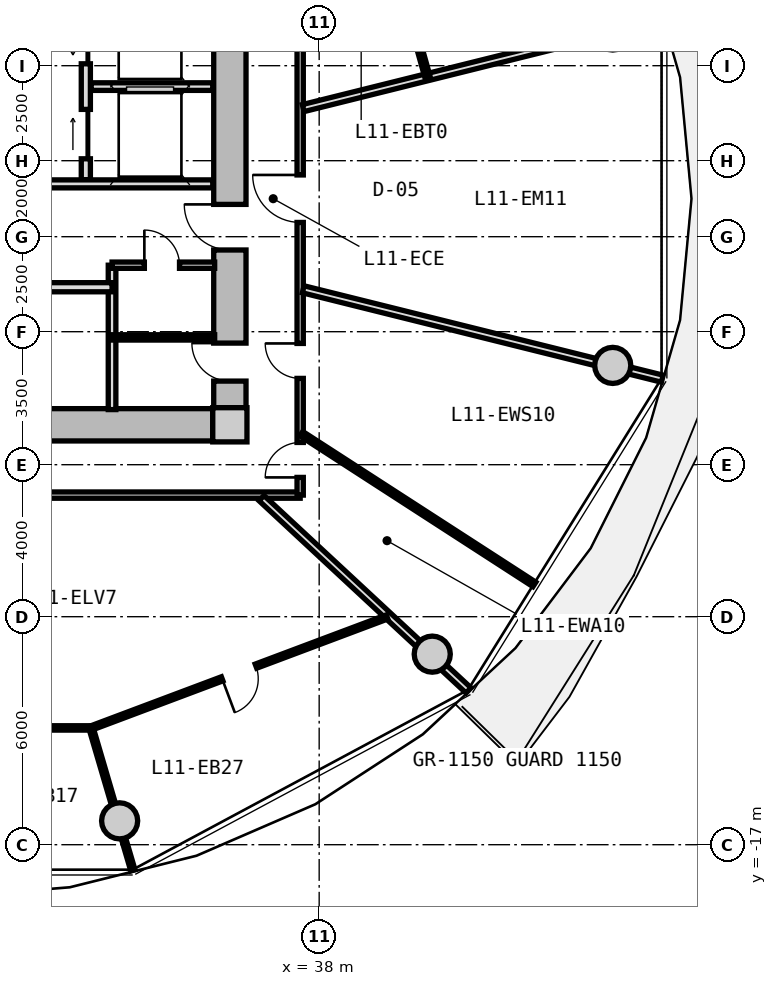
"""IFC4 building model, lengths in metres.
Left out: names, types, materials, properties, quantities, classifications, styles, units other than length and angle.
Written with IfcOpenShell. Run it as: python <this file> out.ifc"""

import sys

from ifc_helpers import new_model, si_unit, direction, frame, frame_2d, origin, origin_2d, place, context, subcontext, project, spatial, rectangle, circle, extrude, source, transform, mapped, element, fill, save


model = new_model("IFC4")
c1 = context("Model", 3, precision=1e-05, world=origin(), true_north=direction((0.0, 1.0)))
c2 = subcontext(c1, "Body", "Model", "MODEL_VIEW")
j1 = project(units=[si_unit("LENGTHUNIT", "METRE"), si_unit("PLANEANGLEUNIT", "RADIAN")], contexts=[c1])
p1 = place(None, origin())
s1 = spatial("IfcSite", under=j1, at=p1, CompositionType="ELEMENT")
p2 = place(p1, origin())
s2 = spatial("IfcBuilding", under=s1, at=p2, CompositionType="ELEMENT")
p3 = place(p2, frame((0.0, 0.0, 39.9)))
s3 = spatial("IfcBuildingStorey", under=s2, at=p3, CompositionType="ELEMENT", Elevation=39.9)
m1 = source(origin(), c2, "Body", "SweptSolid", [
    extrude(rectangle(XDim=0.9, YDim=0.9, at=origin_2d()), origin(), (0.0, 0.0, 1.0), 3.05),
])
p4 = place(p3, frame((35.65, -5.95, 0.0), z_axis=(0.0, 0.0, 1.0), x_axis=(1.0, 0.0, 0.0)))
e1 = element("IfcColumn", 1, at=p4, inside=s3, PredefinedType="COLUMN", context=c2, shape_type="MappedRepresentation", body=[
    mapped(m1, transform((0.0, 0.0, 0.0), x_axis=(1.0, 0.0, 0.0), y_axis=(0.0, 1.0, 0.0), z_axis=(0.0, 0.0, 1.0), scale=1.0)),
])
m2 = source(origin(), c2, "Body", "SweptSolid", [
    extrude(rectangle(XDim=14.4, YDim=0.85, at=frame_2d((7.2, 0.0))), origin(), (0.0, 0.0, 1.0), 2.79),
])
p5 = place(p3, frame((35.2, -5.95, 0.0), z_axis=(0.0, 0.0, 1.0), x_axis=(-1.0, 0.0, 0.0)))
e2 = element("IfcWall", 2, at=p5, inside=s3, PredefinedType="SHEAR", context=c2, shape_type="MappedRepresentation", body=[
    mapped(m2, transform((0.0, 0.0, 0.0), x_axis=(1.0, 0.0, 0.0), y_axis=(0.0, 1.0, 0.0), z_axis=(0.0, 0.0, 1.0), scale=1.0)),
])
m3 = source(origin(), c2, "Body", "SweptSolid", [
    extrude(rectangle(XDim=11.0, YDim=0.85, at=frame_2d((5.5, 0.0))), origin(), (0.0, 0.0, 1.0), 2.79),
])
p6 = place(p3, frame((35.65, 5.5, 0.0), z_axis=(0.0, 0.0, 1.0), x_axis=(0.0, -1.0, 0.0)))
e3 = element("IfcWall", 3, at=p6, inside=s3, PredefinedType="SHEAR", context=c2, shape_type="MappedRepresentation", body=[
    mapped(m3, transform((0.0, 0.0, 0.0), x_axis=(1.0, 0.0, 0.0), y_axis=(0.0, 1.0, 0.0), z_axis=(0.0, 0.0, 1.0), scale=1.0)),
])
p7 = place(p6, frame((5.65, 0.0, 0.0)))
e4 = element("IfcOpeningElement", 4, at=p7, cuts=e3, PredefinedType="OPENING", context=c2, shape_type="SweptSolid", body=[
    extrude(rectangle(XDim=1.2, YDim=2.15, at=frame_2d((0.6, 1.075))), frame((0.0, 0.435, 0.0), z_axis=(0.0, -1.0, 0.0), x_axis=(1.0, 0.0, 0.0)), (0.0, 0.0, 1.0), 0.87),
])
p8 = place(p6, frame((9.3, 0.0, 0.0)))
e5 = element("IfcOpeningElement", 5, at=p8, cuts=e3, PredefinedType="OPENING", context=c2, shape_type="SweptSolid", body=[
    extrude(rectangle(XDim=1.0, YDim=2.1, at=frame_2d((0.5, 1.05))), frame((0.0, 0.435, 0.0), z_axis=(0.0, -1.0, 0.0), x_axis=(1.0, 0.0, 0.0)), (0.0, 0.0, 1.0), 0.87),
])
m4 = source(origin(), c2, "Body", "SweptSolid", [
    extrude(circle(Radius=0.475, at=origin_2d()), origin(), (0.0, 0.0, 1.0), 3.05),
])
for number, where, z_axis, x_axis in (
    (6, (32.749, -16.373, 0.0), (0.0, 0.0, 1.0), (1.0, 0.0, 0.0)),
    (7, (40.975, -11.985, 0.0), (0.0, 0.0, 1.0), (1.0, 0.0, 0.0)),
    (8, (45.725, -4.387, 0.0), (0.0, 0.0, 1.0), (1.0, 0.0, 0.0)),
):
    element("IfcColumn", number, at=place(p3, frame(where, z_axis=z_axis, x_axis=x_axis)), inside=s3, PredefinedType="COLUMN", context=c2, shape_type="MappedRepresentation", body=[
        mapped(m4, transform((0.0, 0.0, 0.0), x_axis=(1.0, 0.0, 0.0), y_axis=(0.0, 1.0, 0.0), z_axis=(0.0, 0.0, 1.0), scale=1.0)),
    ])
m5 = source(origin(), c2, "Body", "SweptSolid", [
    extrude(rectangle(XDim=5.0, YDim=0.24, at=frame_2d((2.5, 0.0))), origin(), (0.0, 0.0, 1.0), 2.775),
])
p9 = place(p3, frame((31.86, 0.5, 0.0), z_axis=(0.0, 0.0, 1.0), x_axis=(0.0, 1.0, 0.0)))
e9 = element("IfcWall", 9, at=p9, inside=s3, PredefinedType="PARTITIONING", context=c2, shape_type="MappedRepresentation", body=[
    mapped(m5, transform((0.0, 0.0, 0.0), x_axis=(1.0, 0.0, 0.0), y_axis=(0.0, 1.0, 0.0), z_axis=(0.0, 0.0, 1.0), scale=1.0)),
])
p10 = place(p9, frame((3.05, 0.0, 0.0)))
e10 = element("IfcOpeningElement", 10, at=p10, cuts=e9, PredefinedType="OPENING", context=c2, shape_type="SweptSolid", body=[
    extrude(rectangle(XDim=1.3, YDim=2.2, at=frame_2d((0.65, 1.1))), frame((0.0, 0.13, 0.0), z_axis=(0.0, -1.0, 0.0), x_axis=(1.0, 0.0, 0.0)), (0.0, 0.0, 1.0), 0.26),
])
p11 = place(p9, frame((0.55, 0.0, 0.0)))
e11 = element("IfcOpeningElement", 11, at=p11, cuts=e9, PredefinedType="OPENING", context=c2, shape_type="SweptSolid", body=[
    extrude(rectangle(XDim=1.3, YDim=2.2, at=frame_2d((0.65, 1.1))), frame((0.0, 0.13, 0.0), z_axis=(0.0, -1.0, 0.0), x_axis=(1.0, 0.0, 0.0)), (0.0, 0.0, 1.0), 0.26),
])
m6 = source(origin(), c2, "Body", "SweptSolid", [
    extrude(rectangle(XDim=3.2, YDim=0.2, at=frame_2d((1.6, 0.0))), origin(), (0.0, 0.0, 1.0), 2.775),
])
p12 = place(p3, frame((32.0, 2.95, 0.0), z_axis=(0.0, 0.0, 1.0), x_axis=(1.0, 0.0, 0.0)))
e12 = element("IfcWall", 12, at=p12, inside=s3, PredefinedType="PARTITIONING", context=c2, shape_type="MappedRepresentation", body=[
    mapped(m6, transform((0.0, 0.0, 0.0), x_axis=(1.0, 0.0, 0.0), y_axis=(0.0, 1.0, 0.0), z_axis=(0.0, 0.0, 1.0), scale=1.0)),
])
m7 = source(origin(), c2, "Body", "SweptSolid", [
    extrude(rectangle(XDim=6.66, YDim=0.21, at=frame_2d((3.33, 0.0))), origin(), (0.0, 0.0, 1.0), 2.775),
])
p13 = place(p3, frame((28.54, 0.39, 0.0), z_axis=(0.0, 0.0, 1.0), x_axis=(1.0, 0.0, 0.0)))
e13 = element("IfcWall", 13, at=p13, inside=s3, PredefinedType="PARTITIONING", context=c2, shape_type="MappedRepresentation", body=[
    mapped(m7, transform((0.0, 0.0, 0.0), x_axis=(1.0, 0.0, 0.0), y_axis=(0.0, 1.0, 0.0), z_axis=(0.0, 0.0, 1.0), scale=1.0)),
])
p14 = place(p13, frame((1.0, 0.0, 0.0)))
e14 = element("IfcOpeningElement", 14, at=p14, cuts=e13, PredefinedType="OPENING", context=c2, shape_type="SweptSolid", body=[
    extrude(rectangle(XDim=1.2, YDim=2.15, at=frame_2d((0.6, 1.075))), frame((0.0, 0.115, 0.0), z_axis=(0.0, -1.0, 0.0), x_axis=(1.0, 0.0, 0.0)), (0.0, 0.0, 1.0), 0.23),
])
m8 = source(origin(), c2, "Body", "SweptSolid", [
    extrude(rectangle(XDim=3.8, YDim=0.2, at=frame_2d((1.9, 0.0))), origin(), (0.0, 0.0, 1.0), 2.775),
])
p15 = place(p3, frame((32.55, -5.55, 0.0), z_axis=(0.0, 0.0, 1.0), x_axis=(0.0, 1.0, 0.0)))
e15 = element("IfcWall", 15, at=p15, inside=s3, PredefinedType="PARTITIONING", context=c2, shape_type="MappedRepresentation", body=[
    mapped(m8, transform((0.0, 0.0, 0.0), x_axis=(1.0, 0.0, 0.0), y_axis=(0.0, 1.0, 0.0), z_axis=(0.0, 0.0, 1.0), scale=1.0)),
])
m9 = source(origin(), c2, "Body", "SweptSolid", [
    extrude(rectangle(XDim=4.13, YDim=0.24, at=frame_2d((2.065, 0.0))), origin(), (0.0, 0.0, 1.0), 2.775),
])
p16 = place(p3, frame((28.42, -2.33, 0.0), z_axis=(0.0, 0.0, 1.0), x_axis=(1.0, 0.0, 0.0)))
e16 = element("IfcWall", 16, at=p16, inside=s3, PredefinedType="PARTITIONING", context=c2, shape_type="MappedRepresentation", body=[
    mapped(m9, transform((0.0, 0.0, 0.0), x_axis=(1.0, 0.0, 0.0), y_axis=(0.0, 1.0, 0.0), z_axis=(0.0, 0.0, 1.0), scale=1.0)),
])
m10 = source(origin(), c2, "Body", "SweptSolid", [
    extrude(rectangle(XDim=2.7, YDim=0.165, at=frame_2d((1.35, 0.0))), origin(), (0.0, 0.0, 1.0), 2.775),
])
p17 = place(p3, frame((32.55, -1.75, 0.0), z_axis=(0.0, 0.0, 1.0), x_axis=(1.0, 0.0, 0.0)))
e17 = element("IfcWall", 17, at=p17, inside=s3, PredefinedType="PARTITIONING", context=c2, shape_type="MappedRepresentation", body=[
    mapped(m10, transform((0.0, 0.0, 0.0), x_axis=(1.0, 0.0, 0.0), y_axis=(0.0, 1.0, 0.0), z_axis=(0.0, 0.0, 1.0), scale=1.0)),
])
p18 = place(p17, frame((0.85, 0.0, 0.0)))
e18 = element("IfcOpeningElement", 18, at=p18, cuts=e17, PredefinedType="OPENING", context=c2, shape_type="SweptSolid", body=[
    extrude(rectangle(XDim=0.925, YDim=2.1, at=frame_2d((0.462, 1.05))), frame((0.0, 0.093, 0.0), z_axis=(0.0, -1.0, 0.0), x_axis=(1.0, 0.0, 0.0)), (0.0, 0.0, 1.0), 0.185),
])
m11 = source(origin(), c2, "Body", "SweptSolid", [
    extrude(rectangle(XDim=2.7, YDim=0.14, at=frame_2d((1.35, 0.0))), origin(), (0.0, 0.0, 1.0), 2.775),
])
p19 = place(p3, frame((32.55, -3.65, 0.0), z_axis=(0.0, 0.0, 1.0), x_axis=(1.0, 0.0, 0.0)))
e19 = element("IfcWall", 19, at=p19, inside=s3, PredefinedType="PARTITIONING", context=c2, shape_type="MappedRepresentation", body=[
    mapped(m11, transform((0.0, 0.0, 0.0), x_axis=(1.0, 0.0, 0.0), y_axis=(0.0, 1.0, 0.0), z_axis=(0.0, 0.0, 1.0), scale=1.0)),
])
m12 = source(origin(), c2, "Body", "SweptSolid", [
    extrude(rectangle(XDim=19.0, YDim=0.165, at=frame_2d((9.5, 0.0))), origin(), (0.0, 0.0, 1.0), 2.775),
])
p20 = place(p3, frame((37.5, -7.8, 0.0), z_axis=(0.0, 0.0, 1.0), x_axis=(-1.0, 0.0, 0.0)))
e20 = element("IfcWall", 20, at=p20, inside=s3, PredefinedType="PARTITIONING", context=c2, shape_type="MappedRepresentation", body=[
    mapped(m12, transform((0.0, 0.0, 0.0), x_axis=(1.0, 0.0, 0.0), y_axis=(0.0, 1.0, 0.0), z_axis=(0.0, 0.0, 1.0), scale=1.0)),
])
p21 = place(p20, frame((7.336, 0.0, 0.0)))
e21 = element("IfcOpeningElement", 21, at=p21, cuts=e20, PredefinedType="OPENING", context=c2, shape_type="SweptSolid", body=[
    extrude(rectangle(XDim=1.05, YDim=2.15, at=frame_2d((0.525, 1.075))), frame((0.0, 0.093, 0.0), z_axis=(0.0, -1.0, 0.0), x_axis=(1.0, 0.0, 0.0)), (0.0, 0.0, 1.0), 0.185),
])
m13 = source(origin(), c2, "Body", "SweptSolid", [
    extrude(rectangle(XDim=15.6, YDim=0.165, at=frame_2d((7.8, 0.0))), origin(), (0.0, 0.0, 1.0), 2.775),
])
p22 = place(p3, frame((37.5, 7.8, 0.0), z_axis=(0.0, 0.0, 1.0), x_axis=(0.0, -1.0, 0.0)))
e22 = element("IfcWall", 22, at=p22, inside=s3, PredefinedType="PARTITIONING", context=c2, shape_type="MappedRepresentation", body=[
    mapped(m13, transform((0.0, 0.0, 0.0), x_axis=(1.0, 0.0, 0.0), y_axis=(0.0, 1.0, 0.0), z_axis=(0.0, 0.0, 1.0), scale=1.0)),
])
p23 = place(p22, frame((14.215, 0.0, 0.0)))
e23 = element("IfcOpeningElement", 23, at=p23, cuts=e22, PredefinedType="OPENING", context=c2, shape_type="SweptSolid", body=[
    extrude(rectangle(XDim=0.92, YDim=2.1, at=frame_2d((0.46, 1.05))), frame((0.0, 0.093, 0.0), z_axis=(0.0, -1.0, 0.0), x_axis=(1.0, 0.0, 0.0)), (0.0, 0.0, 1.0), 0.185),
])
p24 = place(p22, frame((11.609, 0.0, 0.0)))
e24 = element("IfcOpeningElement", 24, at=p24, cuts=e22, PredefinedType="OPENING", context=c2, shape_type="SweptSolid", body=[
    extrude(rectangle(XDim=0.92, YDim=2.1, at=frame_2d((0.46, 1.05))), frame((0.0, 0.093, 0.0), z_axis=(0.0, -1.0, 0.0), x_axis=(1.0, 0.0, 0.0)), (0.0, 0.0, 1.0), 0.185),
])
p25 = place(p22, frame((7.175, 0.0, 0.0)))
e25 = element("IfcOpeningElement", 25, at=p25, cuts=e22, PredefinedType="OPENING", context=c2, shape_type="SweptSolid", body=[
    extrude(rectangle(XDim=1.25, YDim=2.2, at=frame_2d((0.625, 1.1))), frame((0.0, 0.093, 0.0), z_axis=(0.0, -1.0, 0.0), x_axis=(1.0, 0.0, 0.0)), (0.0, 0.0, 1.0), 0.185),
])
m14 = source(origin(), c2, "Body", "SweptSolid", [
    extrude(rectangle(XDim=7.435, YDim=0.19, at=frame_2d((3.717, 0.0))), origin(), (0.0, 0.0, 1.0), 2.225),
])
p26 = place(p3, frame((36.483, -7.88, 0.0), z_axis=(0.0, 0.0, 1.0), x_axis=(0.732651956848, -0.680603489652, 0.0)))
e26 = element("IfcWall", 26, at=p26, inside=s3, PredefinedType="PARTITIONING", context=c2, shape_type="MappedRepresentation", body=[
    mapped(m14, transform((0.0, 0.0, 0.0), x_axis=(1.0, 0.0, 0.0), y_axis=(0.0, 1.0, 0.0), z_axis=(0.0, 0.0, 1.0), scale=1.0)),
])
m15 = source(origin(), c2, "Body", "SweptSolid", [
    extrude(rectangle(XDim=7.993, YDim=0.115, at=frame_2d((3.996, 0.0))), origin(), (0.0, 0.0, 1.0), 2.775),
])
p27 = place(p3, frame((24.004, -13.927, 0.0), z_axis=(0.0, 0.0, 1.0), x_axis=(1.0, 0.0, 0.0)))
e27 = element("IfcWall", 27, at=p27, inside=s3, PredefinedType="PARTITIONING", context=c2, shape_type="MappedRepresentation", body=[
    mapped(m15, transform((0.0, 0.0, 0.0), x_axis=(1.0, 0.0, 0.0), y_axis=(0.0, 1.0, 0.0), z_axis=(0.0, 0.0, 1.0), scale=1.0)),
])
p28 = place(p27, frame((3.521, 0.0, 0.0)))
e28 = element("IfcOpeningElement", 28, at=p28, cuts=e27, PredefinedType="OPENING", context=c2, shape_type="SweptSolid", body=[
    extrude(rectangle(XDim=0.95, YDim=2.1, at=frame_2d((0.475, 1.05))), frame((0.0, 0.067, 0.0), z_axis=(0.0, -1.0, 0.0), x_axis=(1.0, 0.0, 0.0)), (0.0, 0.0, 1.0), 0.135),
])
m16 = source(origin(), c2, "Body", "SweptSolid", [
    extrude(rectangle(XDim=8.32, YDim=0.115, at=frame_2d((4.16, 0.0))), origin(), (0.0, 0.0, 1.0), 2.775),
])
p29 = place(p3, frame((31.997, -13.93, 0.0), z_axis=(0.0, 0.0, 1.0), x_axis=(0.936180763098, 0.351518959382, 0.0)))
e29 = element("IfcWall", 29, at=p29, inside=s3, PredefinedType="PARTITIONING", context=c2, shape_type="MappedRepresentation", body=[
    mapped(m16, transform((0.0, 0.0, 0.0), x_axis=(1.0, 0.0, 0.0), y_axis=(0.0, 1.0, 0.0), z_axis=(0.0, 0.0, 1.0), scale=1.0)),
])
p30 = place(p29, frame((3.685, 0.0, 0.0)))
e30 = element("IfcOpeningElement", 30, at=p30, cuts=e29, PredefinedType="OPENING", context=c2, shape_type="SweptSolid", body=[
    extrude(rectangle(XDim=0.95, YDim=2.1, at=frame_2d((0.475, 1.05))), frame((0.0, 0.067, 0.0), z_axis=(0.0, -1.0, 0.0), x_axis=(1.0, 0.0, 0.0)), (0.0, 0.0, 1.0), 0.135),
])
m17 = source(origin(), c2, "Body", "SweptSolid", [
    extrude(rectangle(XDim=3.905, YDim=0.115, at=frame_2d((1.952, 0.0))), origin(), (0.0, 0.0, 1.0), 2.225),
])
p31 = place(p3, frame((31.997, -13.93, 0.0), z_axis=(0.0, 0.0, 1.0), x_axis=(0.282037692958, -0.959403324859, 0.0)))
e31 = element("IfcWall", 31, at=p31, inside=s3, PredefinedType="PARTITIONING", context=c2, shape_type="MappedRepresentation", body=[
    mapped(m17, transform((0.0, 0.0, 0.0), x_axis=(1.0, 0.0, 0.0), y_axis=(0.0, 1.0, 0.0), z_axis=(0.0, 0.0, 1.0), scale=1.0)),
])
m18 = source(origin(), c2, "Body", "SweptSolid", [
    extrude(rectangle(XDim=9.737, YDim=0.19, at=frame_2d((4.869, 0.0))), origin(), (0.0, 0.0, 1.0), 2.225),
])
p32 = place(p3, frame((37.58, -2.385, 0.0), z_axis=(0.0, 0.0, 1.0), x_axis=(0.970392716238, -0.241532557375, 0.0)))
e32 = element("IfcWall", 32, at=p32, inside=s3, PredefinedType="PARTITIONING", context=c2, shape_type="MappedRepresentation", body=[
    mapped(m18, transform((0.0, 0.0, 0.0), x_axis=(1.0, 0.0, 0.0), y_axis=(0.0, 1.0, 0.0), z_axis=(0.0, 0.0, 1.0), scale=1.0)),
])
m19 = source(origin(), c2, "Body", "SweptSolid", [
    extrude(rectangle(XDim=7.304, YDim=0.14, at=frame_2d((3.652, 0.0))), origin(), (0.0, 0.0, 1.0), 2.775),
])
p33 = place(p3, frame((37.53, -6.185, 0.0), z_axis=(0.0, 0.0, 1.0), x_axis=(0.83973870965, -0.54299069929, 0.0)))
e33 = element("IfcWall", 33, at=p33, inside=s3, PredefinedType="PARTITIONING", context=c2, shape_type="MappedRepresentation", body=[
    mapped(m19, transform((0.0, 0.0, 0.0), x_axis=(1.0, 0.0, 0.0), y_axis=(0.0, 1.0, 0.0), z_axis=(0.0, 0.0, 1.0), scale=1.0)),
])
p34 = place(p3, frame((37.58, 2.385, 0.0), z_axis=(0.0, 0.0, 1.0), x_axis=(0.970392716238, 0.241532557375, 0.0)))
e34 = element("IfcWall", 34, at=p34, inside=s3, PredefinedType="PARTITIONING", context=c2, shape_type="MappedRepresentation", body=[
    mapped(m18, transform((0.0, 0.0, 0.0), x_axis=(1.0, 0.0, 0.0), y_axis=(0.0, 1.0, 0.0), z_axis=(0.0, 0.0, 1.0), scale=1.0)),
])
m20 = source(origin(), c2, "Body", "SweptSolid", [
    extrude(rectangle(XDim=2.885, YDim=0.14, at=frame_2d((1.442, 0.0))), origin(), (0.0, 0.0, 1.0), 2.775),
])
p35 = place(p3, frame((40.069, 5.992, 0.0), z_axis=(0.0, 0.0, 1.0), x_axis=(0.269799431837, -0.962916541856, 0.0)))
e35 = element("IfcWall", 35, at=p35, inside=s3, PredefinedType="PARTITIONING", context=c2, shape_type="MappedRepresentation", body=[
    mapped(m20, transform((0.0, 0.0, 0.0), x_axis=(1.0, 0.0, 0.0), y_axis=(0.0, 1.0, 0.0), z_axis=(0.0, 0.0, 1.0), scale=1.0)),
])
p36 = place(p35, frame((0.982, 0.0, 0.0)))
e36 = element("IfcOpeningElement", 36, at=p36, cuts=e35, PredefinedType="OPENING", context=c2, shape_type="SweptSolid", body=[
    extrude(rectangle(XDim=0.92, YDim=2.1, at=frame_2d((0.46, 1.05))), frame((0.0, 0.08, 0.0), z_axis=(0.0, -1.0, 0.0), x_axis=(1.0, 0.0, 0.0)), (0.0, 0.0, 1.0), 0.16),
])
m21 = source(origin(), c2, "Body", "SweptSolid", [
    extrude(rectangle(XDim=1.3, YDim=2.2, at=frame_2d((0.65, 1.1))), frame((0.0, 0.025, 0.0), z_axis=(0.0, -1.0, 0.0), x_axis=(1.0, 0.0, 0.0)), (0.0, 0.0, 1.0), 0.05),
])
p37 = place(p10, origin())
e37 = element("IfcDoor", 37, at=p37, inside=s3, OperationType="SLIDING_TO_LEFT", PredefinedType="DOOR", context=c2, shape_type="MappedRepresentation", body=[
    mapped(m21, transform((0.0, 0.0, 0.0), x_axis=(1.0, 0.0, 0.0), y_axis=(0.0, 1.0, 0.0), z_axis=(0.0, 0.0, 1.0), scale=1.0)),
])
fill(e10, e37)
p38 = place(p11, origin())
e38 = element("IfcDoor", 38, at=p38, inside=s3, OperationType="SLIDING_TO_RIGHT", PredefinedType="DOOR", context=c2, shape_type="MappedRepresentation", body=[
    mapped(m21, transform((0.0, 0.0, 0.0), x_axis=(1.0, 0.0, 0.0), y_axis=(0.0, 1.0, 0.0), z_axis=(0.0, 0.0, 1.0), scale=1.0)),
])
fill(e11, e38)
m22 = source(origin(), c2, "Body", "SweptSolid", [
    extrude(rectangle(XDim=1.2, YDim=2.15, at=frame_2d((0.6, 1.075))), frame((0.0, 0.025, 0.0), z_axis=(0.0, -1.0, 0.0), x_axis=(1.0, 0.0, 0.0)), (0.0, 0.0, 1.0), 0.05),
])
p39 = place(p7, frame((1.2, 0.0, 0.0), z_axis=(0.0, 0.0, 1.0), x_axis=(-1.0, 0.0, 0.0)))
e39 = element("IfcDoor", 39, at=p39, inside=s3, OperationType="SINGLE_SWING_RIGHT", PredefinedType="DOOR", context=c2, shape_type="MappedRepresentation", body=[
    mapped(m22, transform((0.0, 0.0, 0.0), x_axis=(1.0, 0.0, 0.0), y_axis=(0.0, 1.0, 0.0), z_axis=(0.0, 0.0, 1.0), scale=1.0)),
])
fill(e4, e39)
m23 = source(origin(), c2, "Body", "SweptSolid", [
    extrude(rectangle(XDim=0.925, YDim=2.1, at=frame_2d((0.462, 1.05))), frame((0.0, 0.025, 0.0), z_axis=(0.0, -1.0, 0.0), x_axis=(1.0, 0.0, 0.0)), (0.0, 0.0, 1.0), 0.05),
])
p40 = place(p18, origin())
e40 = element("IfcDoor", 40, at=p40, inside=s3, OperationType="SINGLE_SWING_LEFT", PredefinedType="DOOR", context=c2, shape_type="MappedRepresentation", body=[
    mapped(m23, transform((0.0, 0.0, 0.0), x_axis=(1.0, 0.0, 0.0), y_axis=(0.0, 1.0, 0.0), z_axis=(0.0, 0.0, 1.0), scale=1.0)),
])
fill(e18, e40)
m24 = source(origin(), c2, "Body", "SweptSolid", [
    extrude(rectangle(XDim=1.0, YDim=2.1, at=frame_2d((0.5, 1.05))), frame((0.0, 0.025, 0.0), z_axis=(0.0, -1.0, 0.0), x_axis=(1.0, 0.0, 0.0)), (0.0, 0.0, 1.0), 0.05),
])
p41 = place(p8, frame((1.0, 0.0, 0.0), z_axis=(0.0, 0.0, 1.0), x_axis=(-1.0, 0.0, 0.0)))
e41 = element("IfcDoor", 41, at=p41, inside=s3, OperationType="SINGLE_SWING_RIGHT", PredefinedType="DOOR", context=c2, shape_type="MappedRepresentation", body=[
    mapped(m24, transform((0.0, 0.0, 0.0), x_axis=(1.0, 0.0, 0.0), y_axis=(0.0, 1.0, 0.0), z_axis=(0.0, 0.0, 1.0), scale=1.0)),
])
fill(e5, e41)
m25 = source(origin(), c2, "Body", "SweptSolid", [
    extrude(rectangle(XDim=0.95, YDim=2.1, at=frame_2d((0.475, 1.05))), frame((0.0, 0.025, 0.0), z_axis=(0.0, -1.0, 0.0), x_axis=(1.0, 0.0, 0.0)), (0.0, 0.0, 1.0), 0.05),
])
p42 = place(p30, frame((0.95, 0.0, 0.0), z_axis=(0.0, 0.0, 1.0), x_axis=(-1.0, 0.0, 0.0)))
e42 = element("IfcDoor", 42, at=p42, inside=s3, OperationType="SINGLE_SWING_RIGHT", PredefinedType="DOOR", context=c2, shape_type="MappedRepresentation", body=[
    mapped(m25, transform((0.0, 0.0, 0.0), x_axis=(1.0, 0.0, 0.0), y_axis=(0.0, 1.0, 0.0), z_axis=(0.0, 0.0, 1.0), scale=1.0)),
])
fill(e30, e42)
m26 = source(origin(), c2, "Body", "SweptSolid", [
    extrude(rectangle(XDim=0.92, YDim=2.1, at=frame_2d((0.46, 1.05))), frame((0.0, 0.025, 0.0), z_axis=(0.0, -1.0, 0.0), x_axis=(1.0, 0.0, 0.0)), (0.0, 0.0, 1.0), 0.05),
])
p43 = place(p23, frame((0.92, 0.0, 0.0), z_axis=(0.0, 0.0, 1.0), x_axis=(-1.0, 0.0, 0.0)))
e43 = element("IfcDoor", 43, at=p43, inside=s3, OperationType="SINGLE_SWING_LEFT", PredefinedType="DOOR", context=c2, shape_type="MappedRepresentation", body=[
    mapped(m26, transform((0.0, 0.0, 0.0), x_axis=(1.0, 0.0, 0.0), y_axis=(0.0, 1.0, 0.0), z_axis=(0.0, 0.0, 1.0), scale=1.0)),
])
fill(e23, e43)
p44 = place(p24, frame((0.92, 0.0, 0.0), z_axis=(0.0, 0.0, 1.0), x_axis=(-1.0, 0.0, 0.0)))
e44 = element("IfcDoor", 44, at=p44, inside=s3, OperationType="SINGLE_SWING_RIGHT", PredefinedType="DOOR", context=c2, shape_type="MappedRepresentation", body=[
    mapped(m26, transform((0.0, 0.0, 0.0), x_axis=(1.0, 0.0, 0.0), y_axis=(0.0, 1.0, 0.0), z_axis=(0.0, 0.0, 1.0), scale=1.0)),
])
fill(e24, e44)
m27 = source(origin(), c2, "Body", "SweptSolid", [
    extrude(rectangle(XDim=1.25, YDim=2.2, at=frame_2d((0.625, 1.1))), frame((0.0, 0.025, 0.0), z_axis=(0.0, -1.0, 0.0), x_axis=(1.0, 0.0, 0.0)), (0.0, 0.0, 1.0), 0.05),
])
p45 = place(p25, frame((1.25, 0.0, 0.0), z_axis=(0.0, 0.0, 1.0), x_axis=(-1.0, 0.0, 0.0)))
e45 = element("IfcDoor", 45, at=p45, inside=s3, OperationType="SINGLE_SWING_RIGHT", PredefinedType="DOOR", context=c2, shape_type="MappedRepresentation", body=[
    mapped(m27, transform((0.0, 0.0, 0.0), x_axis=(1.0, 0.0, 0.0), y_axis=(0.0, 1.0, 0.0), z_axis=(0.0, 0.0, 1.0), scale=1.0)),
])
fill(e25, e45)
save(model, sys.argv[1])
